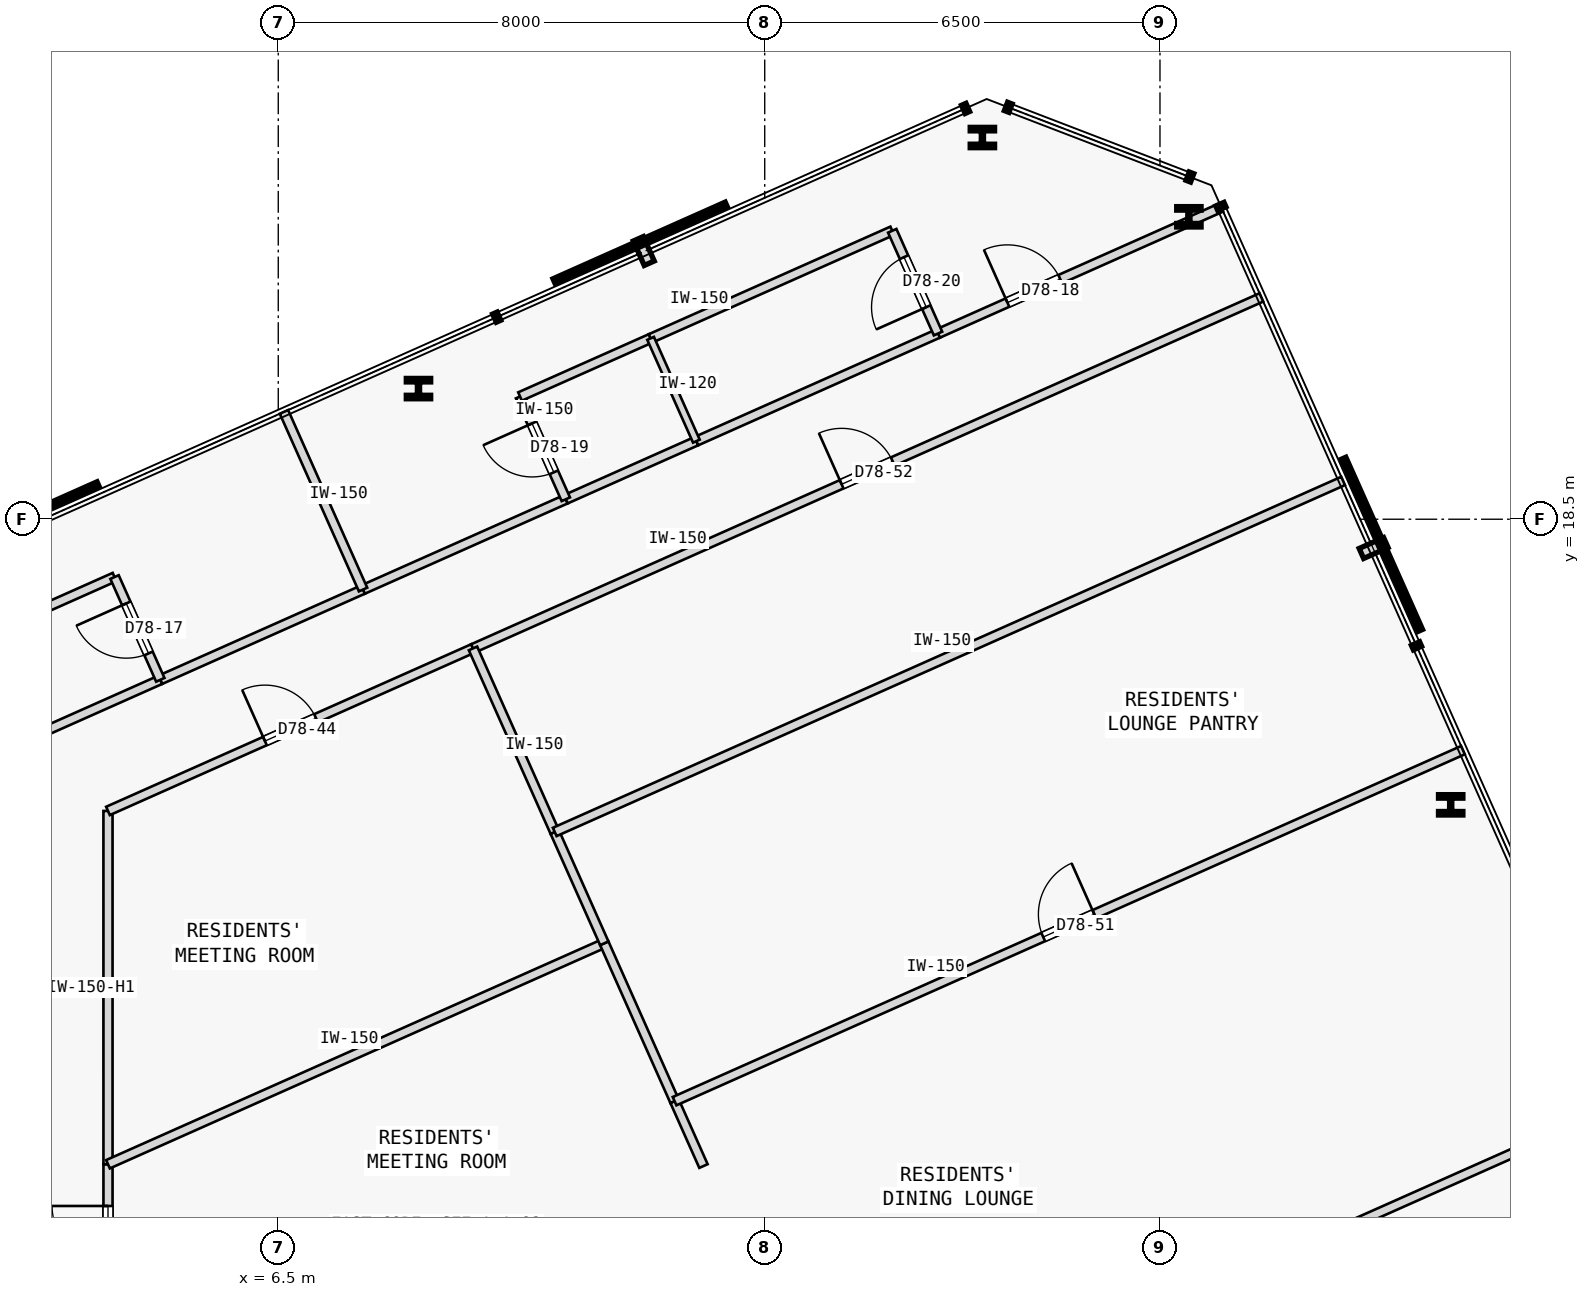
"""IFC4 building model, lengths in metres.
Left out: names, types, materials, properties, quantities, classifications, styles, units other than length and angle.
Written with IfcOpenShell. Run it as: python <this file> out.ifc"""

import sys

from ifc_helpers import new_model, si_unit, direction, frame, frame_2d, origin, origin_2d, place, context, subcontext, project, spatial, rectangle, i_section, extrude, element, fill, save


model = new_model("IFC4")
c1 = context("Model", 3, precision=1e-05, world=origin(), true_north=direction((0.0, 1.0)))
c2 = subcontext(c1, "Body", "Model", "MODEL_VIEW")
j1 = project(units=[si_unit("LENGTHUNIT", "METRE"), si_unit("PLANEANGLEUNIT", "RADIAN")], contexts=[c1])
p1 = place(None, origin())
s1 = spatial("IfcSite", under=j1, at=p1, CompositionType="ELEMENT")
p2 = place(p1, origin())
s2 = spatial("IfcBuilding", under=s1, at=p2, CompositionType="ELEMENT")
p3 = place(p2, frame((0.0, 0.0, 291.95)))
s3 = spatial("IfcBuildingStorey", under=s2, at=p3, CompositionType="ELEMENT", Elevation=291.95)
for number, where, z_axis, x_axis in (
    (1, (25.781, 13.803, 0.0), (0.0, 0.0, 1.0), (1.0, 0.0, 0.0)),
    (2, (21.476, 23.473, 0.0), (0.0, 0.0, 1.0), (1.0, 0.0, 0.0)),
    (3, (18.08, 24.777, 0.0), (0.0, 0.0, 1.0), (1.0, 0.0, 0.0)),
    (4, (8.806, 20.648, 0.0), (0.0, 0.0, 1.0), (1.0, 0.0, 0.0)),
):
    element("IfcColumn", number, at=place(p3, frame(where, z_axis=z_axis, x_axis=x_axis)), inside=s3, PredefinedType="COLUMN", context=c2, shape_type="SweptSolid", body=[
        extrude(i_section(OverallWidth=0.401, OverallDepth=0.335, WebThickness=0.036, FlangeThickness=0.058, FilletRadius=0.015, at=origin_2d()), origin(), (0.0, 0.0, 1.0), 3.35),
    ])
p4 = place(p3, frame((4.56, 15.859, 0.0), z_axis=(0.0, 0.0, 1.0), x_axis=(0.913543802, 0.40674036169, 0.0)))
e5 = element("IfcWall", 5, at=p4, inside=s3, PredefinedType="PARTITIONING", context=c2, shape_type="SweptSolid", body=[
    extrude(rectangle(XDim=3.65, YDim=0.15, at=frame_2d((1.825, 0.0))), origin(), (0.0, 0.0, 1.0), 3.125),
])
p5 = place(p3, frame((0.977, 14.264, 0.0), z_axis=(0.0, 0.0, 1.0), x_axis=(0.913549532696, 0.406727490232, 0.0)))
e6 = element("IfcWall", 6, at=p5, inside=s3, PredefinedType="PARTITIONING", context=c2, shape_type="SweptSolid", body=[
    extrude(rectangle(XDim=3.922, YDim=0.15, at=frame_2d((1.961, 0.0))), origin(), (0.0, 0.0, 1.0), 3.125),
])
p6 = place(p3, frame((7.895, 17.344, 0.0), z_axis=(0.0, 0.0, 1.0), x_axis=(0.913543802, 0.40674036169, 0.0)))
e7 = element("IfcWall", 7, at=p6, inside=s3, PredefinedType="PARTITIONING", context=c2, shape_type="SweptSolid", body=[
    extrude(rectangle(XDim=3.65, YDim=0.15, at=frame_2d((1.825, 0.0))), origin(), (0.0, 0.0, 1.0), 3.125),
])
p7 = place(p3, frame((17.35, 21.553, 0.0), z_axis=(0.0, 0.0, 1.0), x_axis=(0.913558695023, 0.40670691013, 0.0)))
e8 = element("IfcWall", 8, at=p7, inside=s3, PredefinedType="PARTITIONING", context=c2, shape_type="SweptSolid", body=[
    extrude(rectangle(XDim=5.1, YDim=0.15, at=frame_2d((2.55, 0.0))), origin(), (0.0, 0.0, 1.0), 3.125),
])
p8 = place(p7, frame((1.25, 0.0, 0.0)))
e9 = element("IfcOpeningElement", 9, at=p8, cuts=e8, PredefinedType="OPENING", context=c2, shape_type="SweptSolid", body=[
    extrude(rectangle(XDim=0.95, YDim=2.15, at=frame_2d((0.475, 1.075))), frame((0.0, 0.085, 0.0), z_axis=(0.0, -1.0, 0.0), x_axis=(1.0, 0.0, 0.0)), (0.0, 0.0, 1.0), 0.17),
])
p9 = place(p3, frame((11.229, 18.828, 0.0), z_axis=(0.0, 0.0, 1.0), x_axis=(0.913541436194, 0.406745675276, 0.0)))
e10 = element("IfcWall", 10, at=p9, inside=s3, PredefinedType="PARTITIONING", context=c2, shape_type="SweptSolid", body=[
    extrude(rectangle(XDim=2.35, YDim=0.15, at=frame_2d((1.175, 0.0))), origin(), (0.0, 0.0, 1.0), 3.125),
])
p10 = place(p3, frame((13.376, 19.784, 0.0), z_axis=(0.0, 0.0, 1.0), x_axis=(0.913545193015, 0.406737237438, 0.0)))
e11 = element("IfcWall", 11, at=p10, inside=s3, PredefinedType="PARTITIONING", context=c2, shape_type="SweptSolid", body=[
    extrude(rectangle(XDim=4.35, YDim=0.15, at=frame_2d((2.175, 0.0))), origin(), (0.0, 0.0, 1.0), 3.125),
])
p11 = place(p3, frame((3.7, 5.601, 0.0), z_axis=(0.0, 0.0, 1.0), x_axis=(-0.00010651896, 0.999999994327, 0.0)))
e12 = element("IfcWall", 12, at=p11, inside=s3, PredefinedType="PARTITIONING", context=c2, shape_type="SweptSolid", body=[
    extrude(rectangle(XDim=2.292, YDim=0.15, at=frame_2d((1.146, 0.0))), origin(), (0.0, 0.0, 1.0), 3.125),
])
p12 = place(p11, frame((0.686, 0.0, 0.0)))
e13 = element("IfcOpeningElement", 13, at=p12, cuts=e12, PredefinedType="OPENING", context=c2, shape_type="SweptSolid", body=[
    extrude(rectangle(XDim=0.92, YDim=2.15, at=frame_2d((0.46, 1.075))), frame((0.0, 0.085, 0.0), z_axis=(0.0, -1.0, 0.0), x_axis=(1.0, 0.0, 0.0)), (0.0, 0.0, 1.0), 0.17),
])
p13 = place(p3, frame((3.7, 7.893, 0.0), z_axis=(0.0, 0.0, 1.0), x_axis=(-4.2018572e-05, 0.999999999117, 0.0)))
e14 = element("IfcWall", 14, at=p13, inside=s3, PredefinedType="PARTITIONING", context=c2, shape_type="SweptSolid", body=[
    extrude(rectangle(XDim=5.81, YDim=0.15, at=frame_2d((2.905, 0.0))), origin(), (0.0, 0.0, 1.0), 2.675),
])
p14 = place(p3, frame((3.7, 13.703, 0.0), z_axis=(0.0, 0.0, 1.0), x_axis=(0.913549363376, 0.406727870542, 0.0)))
e15 = element("IfcWall", 15, at=p14, inside=s3, PredefinedType="PARTITIONING", context=c2, shape_type="SweptSolid", body=[
    extrude(rectangle(XDim=6.571, YDim=0.15, at=frame_2d((3.286, 0.0))), origin(), (0.0, 0.0, 1.0), 3.125),
])
p15 = place(p14, frame((2.825, 0.0, 0.0)))
e16 = element("IfcOpeningElement", 16, at=p15, cuts=e15, PredefinedType="OPENING", context=c2, shape_type="SweptSolid", body=[
    extrude(rectangle(XDim=0.92, YDim=2.15, at=frame_2d((0.46, 1.075))), frame((0.0, 0.085, 0.0), z_axis=(0.0, -1.0, 0.0), x_axis=(1.0, 0.0, 0.0)), (0.0, 0.0, 1.0), 0.17),
])
p16 = place(p3, frame((9.703, 16.375, 0.0), z_axis=(0.0, 0.0, 1.0), x_axis=(0.913544622417, 0.406738519018, 0.0)))
e17 = element("IfcWall", 17, at=p16, inside=s3, PredefinedType="PARTITIONING", context=c2, shape_type="SweptSolid", body=[
    extrude(rectangle(XDim=14.192, YDim=0.15, at=frame_2d((7.096, 0.0))), origin(), (0.0, 0.0, 1.0), 3.125),
])
p17 = place(p16, frame((6.636, 0.0, 0.0)))
e18 = element("IfcOpeningElement", 18, at=p17, cuts=e17, PredefinedType="OPENING", context=c2, shape_type="SweptSolid", body=[
    extrude(rectangle(XDim=0.92, YDim=2.15, at=frame_2d((0.46, 1.075))), frame((0.0, 0.085, 0.0), z_axis=(0.0, -1.0, 0.0), x_axis=(1.0, 0.0, 0.0)), (0.0, 0.0, 1.0), 0.17),
])
p18 = place(p3, frame((0.225, 15.954, 0.0), z_axis=(0.0, 0.0, 1.0), x_axis=(0.913549532696, 0.406727490232, 0.0)))
e19 = element("IfcWall", 19, at=p18, inside=s3, PredefinedType="PARTITIONING", context=c2, shape_type="SweptSolid", body=[
    extrude(rectangle(XDim=3.922, YDim=0.15, at=frame_2d((1.961, 0.0))), origin(), (0.0, 0.0, 1.0), 3.125),
])
p19 = place(p3, frame((4.56, 15.859, 0.0), z_axis=(0.0, 0.0, 1.0), x_axis=(-0.406701600856, 0.913561058639, 0.0)))
e20 = element("IfcWall", 20, at=p19, inside=s3, PredefinedType="PARTITIONING", context=c2, shape_type="SweptSolid", body=[
    extrude(rectangle(XDim=1.85, YDim=0.15, at=frame_2d((0.925, 0.0))), origin(), (0.0, 0.0, 1.0), 3.125),
])
p20 = place(p19, frame((0.475, 0.0, 0.0)))
e21 = element("IfcOpeningElement", 21, at=p20, cuts=e20, PredefinedType="OPENING", context=c2, shape_type="SweptSolid", body=[
    extrude(rectangle(XDim=0.9, YDim=2.15, at=frame_2d((0.45, 1.075))), frame((0.0, 0.085, 0.0), z_axis=(0.0, -1.0, 0.0), x_axis=(1.0, 0.0, 0.0)), (0.0, 0.0, 1.0), 0.17),
])
p21 = place(p3, frame((7.895, 17.344, 0.0), z_axis=(0.0, 0.0, 1.0), x_axis=(-0.406733350739, 0.913546923478, 0.0)))
e22 = element("IfcWall", 22, at=p21, inside=s3, PredefinedType="PARTITIONING", context=c2, shape_type="SweptSolid", body=[
    extrude(rectangle(XDim=3.198, YDim=0.15, at=frame_2d((1.599, 0.0))), origin(), (0.0, 0.0, 1.0), 3.125),
])
p22 = place(p3, frame((11.229, 18.828, 0.0), z_axis=(0.0, 0.0, 1.0), x_axis=(-0.406750635596, 0.913539227643, 0.0)))
e23 = element("IfcWall", 23, at=p22, inside=s3, PredefinedType="PARTITIONING", context=c2, shape_type="SweptSolid", body=[
    extrude(rectangle(XDim=1.85, YDim=0.15, at=frame_2d((0.925, 0.0))), origin(), (0.0, 0.0, 1.0), 3.125),
])
p23 = place(p22, frame((0.485, 0.0, 0.0)))
e24 = element("IfcOpeningElement", 24, at=p23, cuts=e23, PredefinedType="OPENING", context=c2, shape_type="SweptSolid", body=[
    extrude(rectangle(XDim=0.88, YDim=2.15, at=frame_2d((0.44, 1.075))), frame((0.0, 0.085, 0.0), z_axis=(0.0, -1.0, 0.0), x_axis=(1.0, 0.0, 0.0)), (0.0, 0.0, 1.0), 0.17),
])
p24 = place(p3, frame((10.477, 20.518, 0.0), z_axis=(0.0, 0.0, 1.0), x_axis=(0.913541436194, 0.406745675276, 0.0)))
e25 = element("IfcWall", 25, at=p24, inside=s3, PredefinedType="PARTITIONING", context=c2, shape_type="SweptSolid", body=[
    extrude(rectangle(XDim=2.35, YDim=0.15, at=frame_2d((1.175, 0.0))), origin(), (0.0, 0.0, 1.0), 3.125),
])
p25 = place(p3, frame((12.623, 21.474, 0.0), z_axis=(0.0, 0.0, 1.0), x_axis=(0.913545193015, 0.406737237438, 0.0)))
e26 = element("IfcWall", 26, at=p25, inside=s3, PredefinedType="PARTITIONING", context=c2, shape_type="SweptSolid", body=[
    extrude(rectangle(XDim=4.35, YDim=0.15, at=frame_2d((2.175, 0.0))), origin(), (0.0, 0.0, 1.0), 3.125),
])
p26 = place(p3, frame((17.35, 21.553, 0.0), z_axis=(0.0, 0.0, 1.0), x_axis=(-0.406750635596, 0.913539227643, 0.0)))
e27 = element("IfcWall", 27, at=p26, inside=s3, PredefinedType="PARTITIONING", context=c2, shape_type="SweptSolid", body=[
    extrude(rectangle(XDim=1.85, YDim=0.15, at=frame_2d((0.925, 0.0))), origin(), (0.0, 0.0, 1.0), 3.125),
])
p27 = place(p26, frame((0.475, 0.0, 0.0)))
e28 = element("IfcOpeningElement", 28, at=p27, cuts=e27, PredefinedType="OPENING", context=c2, shape_type="SweptSolid", body=[
    extrude(rectangle(XDim=0.9, YDim=2.15, at=frame_2d((0.45, 1.075))), frame((0.0, 0.085, 0.0), z_axis=(0.0, -1.0, 0.0), x_axis=(1.0, 0.0, 0.0)), (0.0, 0.0, 1.0), 0.17),
])
p28 = place(p3, frame((13.376, 19.784, 0.0), z_axis=(0.0, 0.0, 1.0), x_axis=(-0.406750635596, 0.913539227643, 0.0)))
e29 = element("IfcWall", 29, at=p28, inside=s3, PredefinedType="PARTITIONING", context=c2, shape_type="SweptSolid", body=[
    extrude(rectangle(XDim=1.85, YDim=0.12, at=frame_2d((0.925, 0.0))), origin(), (0.0, 0.0, 1.0), 3.125),
])
p29 = place(p3, frame((3.7, 7.893, 0.0), z_axis=(0.0, 0.0, 1.0), x_axis=(0.913545406364, 0.406736758251, 0.0)))
e30 = element("IfcWall", 30, at=p29, inside=s3, PredefinedType="PARTITIONING", context=c2, shape_type="SweptSolid", body=[
    extrude(rectangle(XDim=8.934, YDim=0.15, at=frame_2d((4.467, 0.0))), origin(), (0.0, 0.0, 1.0), 3.125),
])
p30 = place(p3, frame((13.493, 7.863, 0.0), z_axis=(0.0, 0.0, 1.0), x_axis=(-0.406720145117, 0.913552802829, 0.0)))
e31 = element("IfcWall", 31, at=p30, inside=s3, PredefinedType="PARTITIONING", context=c2, shape_type="SweptSolid", body=[
    extrude(rectangle(XDim=1.168, YDim=0.15, at=frame_2d((0.584, 0.0))), origin(), (0.0, 0.0, 1.0), 3.125),
])
p31 = place(p3, frame((13.018, 8.93, 0.0), z_axis=(0.0, 0.0, 1.0), x_axis=(-0.406768056625, 0.913531470782, 0.0)))
e32 = element("IfcWall", 32, at=p31, inside=s3, PredefinedType="PARTITIONING", context=c2, shape_type="SweptSolid", body=[
    extrude(rectangle(XDim=2.842, YDim=0.15, at=frame_2d((1.421, 0.0))), origin(), (0.0, 0.0, 1.0), 3.125),
])
p32 = place(p3, frame((11.862, 11.526, 0.0), z_axis=(0.0, 0.0, 1.0), x_axis=(-0.406760035505, 0.913535042303, 0.0)))
e33 = element("IfcWall", 33, at=p32, inside=s3, PredefinedType="PARTITIONING", context=c2, shape_type="SweptSolid", body=[
    extrude(rectangle(XDim=2.004, YDim=0.15, at=frame_2d((1.002, 0.0))), origin(), (0.0, 0.0, 1.0), 3.125),
])
p33 = place(p3, frame((11.046, 13.357, 0.0), z_axis=(0.0, 0.0, 1.0), x_axis=(-0.406714303965, 0.913555403328, 0.0)))
e34 = element("IfcWall", 34, at=p33, inside=s3, PredefinedType="PARTITIONING", context=c2, shape_type="SweptSolid", body=[
    extrude(rectangle(XDim=3.304, YDim=0.15, at=frame_2d((1.652, 0.0))), origin(), (0.0, 0.0, 1.0), 3.125),
])
p34 = place(p3, frame((15.616, 3.094, 0.0), z_axis=(0.0, 0.0, 1.0), x_axis=(0.913551014388, 0.406724162191, 0.0)))
e35 = element("IfcWall", 35, at=p34, inside=s3, PredefinedType="PARTITIONING", context=c2, shape_type="SweptSolid", body=[
    extrude(rectangle(XDim=14.192, YDim=0.15, at=frame_2d((7.096, 0.0))), origin(), (0.0, 0.0, 1.0), 3.125),
])
p35 = place(p34, frame((6.636, 0.0, 0.0)))
e36 = element("IfcOpeningElement", 36, at=p35, cuts=e35, PredefinedType="OPENING", context=c2, shape_type="SweptSolid", body=[
    extrude(rectangle(XDim=0.92, YDim=2.15, at=frame_2d((0.46, 1.075))), frame((0.0, 0.085, 0.0), z_axis=(0.0, -1.0, 0.0), x_axis=(1.0, 0.0, 0.0)), (0.0, 0.0, 1.0), 0.17),
])
p36 = place(p3, frame((13.018, 8.93, 0.0), z_axis=(0.0, 0.0, 1.0), x_axis=(0.913551014388, 0.406724162191, 0.0)))
e37 = element("IfcWall", 37, at=p36, inside=s3, PredefinedType="PARTITIONING", context=c2, shape_type="SweptSolid", body=[
    extrude(rectangle(XDim=14.192, YDim=0.15, at=frame_2d((7.096, 0.0))), origin(), (0.0, 0.0, 1.0), 3.125),
])
p37 = place(p36, frame((6.636, 0.0, 0.0)))
e38 = element("IfcOpeningElement", 38, at=p37, cuts=e37, PredefinedType="OPENING", context=c2, shape_type="SweptSolid", body=[
    extrude(rectangle(XDim=0.92, YDim=2.15, at=frame_2d((0.46, 1.075))), frame((0.0, 0.085, 0.0), z_axis=(0.0, -1.0, 0.0), x_axis=(1.0, 0.0, 0.0)), (0.0, 0.0, 1.0), 0.17),
])
p38 = place(p3, frame((11.046, 13.357, 0.0), z_axis=(0.0, 0.0, 1.0), x_axis=(0.913553860075, 0.406717770379, 0.0)))
e39 = element("IfcWall", 39, at=p38, inside=s3, PredefinedType="PARTITIONING", context=c2, shape_type="SweptSolid", body=[
    extrude(rectangle(XDim=14.192, YDim=0.15, at=frame_2d((7.096, 0.0))), origin(), (0.0, 0.0, 1.0), 3.125),
])
p39 = place(p20, origin())
e40 = element("IfcDoor", 40, at=p39, inside=s3, OperationType="SINGLE_SWING_RIGHT", PredefinedType="DOOR", context=c2, shape_type="SweptSolid", body=[
    extrude(rectangle(XDim=0.9, YDim=2.15, at=frame_2d((0.45, 1.075))), frame((0.0, 0.025, 0.0), z_axis=(0.0, -1.0, 0.0), x_axis=(1.0, 0.0, 0.0)), (0.0, 0.0, 1.0), 0.05),
])
fill(e21, e40)
p40 = place(p8, origin())
e41 = element("IfcDoor", 41, at=p40, inside=s3, OperationType="SINGLE_SWING_LEFT", PredefinedType="DOOR", context=c2, shape_type="SweptSolid", body=[
    extrude(rectangle(XDim=0.95, YDim=2.15, at=frame_2d((0.475, 1.075))), frame((0.0, 0.025, 0.0), z_axis=(0.0, -1.0, 0.0), x_axis=(1.0, 0.0, 0.0)), (0.0, 0.0, 1.0), 0.05),
])
fill(e9, e41)
p41 = place(p23, origin())
e42 = element("IfcDoor", 42, at=p41, inside=s3, OperationType="SINGLE_SWING_RIGHT", PredefinedType="DOOR", context=c2, shape_type="SweptSolid", body=[
    extrude(rectangle(XDim=0.88, YDim=2.15, at=frame_2d((0.44, 1.075))), frame((0.0, 0.025, 0.0), z_axis=(0.0, -1.0, 0.0), x_axis=(1.0, 0.0, 0.0)), (0.0, 0.0, 1.0), 0.05),
])
fill(e24, e42)
p42 = place(p27, origin())
e43 = element("IfcDoor", 43, at=p42, inside=s3, OperationType="SINGLE_SWING_LEFT", PredefinedType="DOOR", context=c2, shape_type="SweptSolid", body=[
    extrude(rectangle(XDim=0.9, YDim=2.15, at=frame_2d((0.45, 1.075))), frame((0.0, 0.025, 0.0), z_axis=(0.0, -1.0, 0.0), x_axis=(1.0, 0.0, 0.0)), (0.0, 0.0, 1.0), 0.05),
])
fill(e28, e43)
p43 = place(p12, origin())
e44 = element("IfcDoor", 44, at=p43, inside=s3, OperationType="SINGLE_SWING_RIGHT", PredefinedType="DOOR", context=c2, shape_type="SweptSolid", body=[
    extrude(rectangle(XDim=0.92, YDim=2.15, at=frame_2d((0.46, 1.075))), frame((0.0, 0.025, 0.0), z_axis=(0.0, -1.0, 0.0), x_axis=(1.0, 0.0, 0.0)), (0.0, 0.0, 1.0), 0.05),
])
fill(e13, e44)
p44 = place(p15, origin())
e45 = element("IfcDoor", 45, at=p44, inside=s3, OperationType="SINGLE_SWING_LEFT", PredefinedType="DOOR", context=c2, shape_type="SweptSolid", body=[
    extrude(rectangle(XDim=0.92, YDim=2.15, at=frame_2d((0.46, 1.075))), frame((0.0, 0.025, 0.0), z_axis=(0.0, -1.0, 0.0), x_axis=(1.0, 0.0, 0.0)), (0.0, 0.0, 1.0), 0.05),
])
fill(e16, e45)
p45 = place(p37, origin())
e46 = element("IfcDoor", 46, at=p45, inside=s3, OperationType="SINGLE_SWING_RIGHT", PredefinedType="DOOR", context=c2, shape_type="SweptSolid", body=[
    extrude(rectangle(XDim=0.92, YDim=2.15, at=frame_2d((0.46, 1.075))), frame((0.0, 0.025, 0.0), z_axis=(0.0, -1.0, 0.0), x_axis=(1.0, 0.0, 0.0)), (0.0, 0.0, 1.0), 0.05),
])
fill(e38, e46)
p46 = place(p17, origin())
e47 = element("IfcDoor", 47, at=p46, inside=s3, OperationType="SINGLE_SWING_LEFT", PredefinedType="DOOR", context=c2, shape_type="SweptSolid", body=[
    extrude(rectangle(XDim=0.92, YDim=2.15, at=frame_2d((0.46, 1.075))), frame((0.0, 0.025, 0.0), z_axis=(0.0, -1.0, 0.0), x_axis=(1.0, 0.0, 0.0)), (0.0, 0.0, 1.0), 0.05),
])
fill(e18, e47)
save(model, sys.argv[1])
